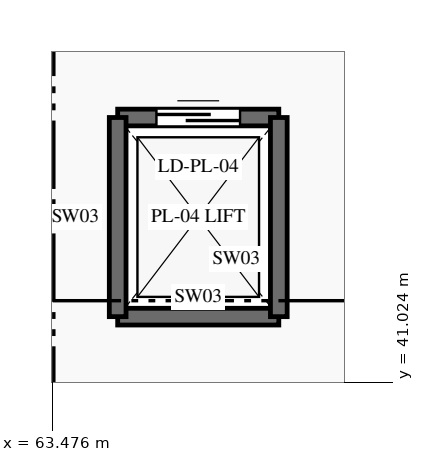
"""IFC4 building model, lengths in metres.
Left out: names, types, materials, properties, quantities, classifications, styles, units other than length and angle.
Written with IfcOpenShell. Run it as: python <this file> out.ifc"""

import sys

from ifc_helpers import new_model, si_unit, direction, frame, frame_2d, origin, place, context, subcontext, project, spatial, rectangle, extrude, element, fill, save


model = new_model("IFC4")
c1 = context("Model", 3, precision=1e-05, world=origin(), true_north=direction((0.0, 1.0)))
c2 = subcontext(c1, "Body", "Model", "MODEL_VIEW")
j1 = project(units=[si_unit("LENGTHUNIT", "METRE"), si_unit("PLANEANGLEUNIT", "RADIAN")], contexts=[c1])
p1 = place(None, origin())
s1 = spatial("IfcSite", under=j1, at=p1, CompositionType="ELEMENT")
p2 = place(p1, origin())
s2 = spatial("IfcBuilding", under=s1, at=p2, CompositionType="ELEMENT")
p3 = place(p2, frame((0.0, 0.0, 6.0)))
s3 = spatial("IfcBuildingStorey", under=s2, at=p3, CompositionType="ELEMENT", Elevation=6.0)
p4 = place(p3, frame((64.34, 41.89, 0.0), z_axis=(0.0, 0.0, 1.0), x_axis=(1.0, 0.0, 0.0)))
e1 = element("IfcWall", 1, at=p4, inside=s3, PredefinedType="SHEAR", context=c2, shape_type="SweptSolid", body=[
    extrude(rectangle(XDim=2.12, YDim=0.22, at=frame_2d((1.06, 0.0))), origin(), (0.0, 0.0, 1.0), 4.8),
])
p5 = place(p3, frame((64.34, 44.51, 0.0), z_axis=(0.0, 0.0, 1.0), x_axis=(1.0, 0.0, 0.0)))
e2 = element("IfcWall", 2, at=p5, inside=s3, PredefinedType="SHEAR", context=c2, shape_type="SweptSolid", body=[
    extrude(rectangle(XDim=2.12, YDim=0.22, at=frame_2d((1.06, 0.0))), origin(), (0.0, 0.0, 1.0), 4.8),
])
p6 = place(p5, frame((0.51, 0.0, 0.0)))
e3 = element("IfcOpeningElement", 3, at=p6, cuts=e2, PredefinedType="OPENING", context=c2, shape_type="SweptSolid", body=[
    extrude(rectangle(XDim=1.1, YDim=2.15, at=frame_2d((0.55, 1.075))), frame((0.0, 0.125, 0.0), z_axis=(0.0, -1.0, 0.0), x_axis=(1.0, 0.0, 0.0)), (0.0, 0.0, 1.0), 0.25),
])
for number, where, z_axis, x_axis in (
    (4, (64.34, 41.89, 0.0), (0.0, 0.0, 1.0), (0.0, 1.0, 0.0)),
    (5, (66.46, 41.89, 0.0), (0.0, 0.0, 1.0), (0.0, 1.0, 0.0)),
):
    element("IfcWall", number, at=place(p3, frame(where, z_axis=z_axis, x_axis=x_axis)), inside=s3, PredefinedType="SHEAR", context=c2, shape_type="SweptSolid", body=[
        extrude(rectangle(XDim=2.62, YDim=0.22, at=frame_2d((1.31, 0.0))), origin(), (0.0, 0.0, 1.0), 4.8),
    ])
p7 = place(p6, origin())
e6 = element("IfcDoor", 6, at=p7, inside=s3, OperationType="SLIDING_TO_RIGHT", PredefinedType="DOOR", context=c2, shape_type="SweptSolid", body=[
    extrude(rectangle(XDim=1.1, YDim=2.15, at=frame_2d((0.55, 1.075))), frame((0.0, 0.025, 0.0), z_axis=(0.0, -1.0, 0.0), x_axis=(1.0, 0.0, 0.0)), (0.0, 0.0, 1.0), 0.05),
])
fill(e3, e6)
save(model, sys.argv[1])
